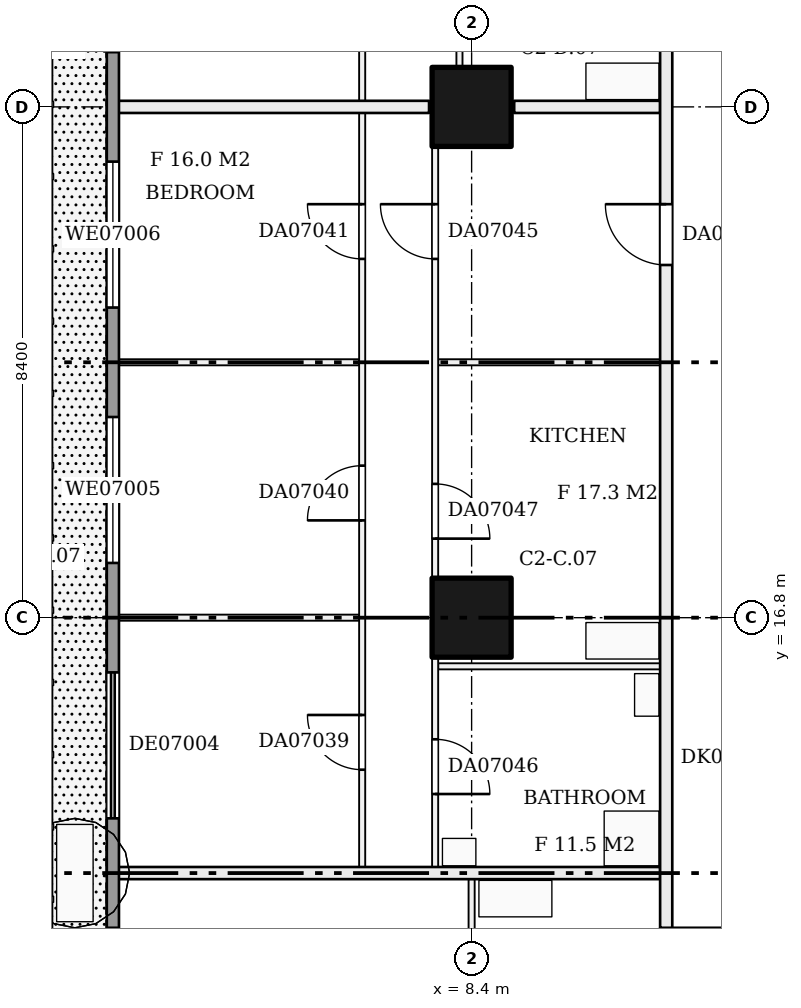
"""IFC4 building model, lengths in metres.
Left out: names, types, materials, properties, quantities, classifications, styles, units other than length and angle.
Written with IfcOpenShell. Run it as: python <this file> out.ifc"""

import sys

from ifc_helpers import new_model, si_unit, direction, frame, frame_2d, origin, origin_2d, place, context, subcontext, project, spatial, rectangle, extrude, element, fill, save


model = new_model("IFC4")
c1 = context("Model", 3, precision=1e-05, world=origin(), true_north=direction((0.0, 1.0)))
c2 = subcontext(c1, "Body", "Model", "MODEL_VIEW")
j1 = project(units=[si_unit("LENGTHUNIT", "METRE"), si_unit("PLANEANGLEUNIT", "RADIAN")], contexts=[c1])
p1 = place(None, origin())
s1 = spatial("IfcSite", under=j1, at=p1, CompositionType="ELEMENT")
p2 = place(p1, origin())
s2 = spatial("IfcBuilding", under=s1, at=p2, CompositionType="ELEMENT")
p3 = place(p2, frame((0.0, 0.0, 35.7)))
s3 = spatial("IfcBuildingStorey", under=s2, at=p3, CompositionType="ELEMENT", Elevation=35.7)
for number, where, z_axis, x_axis in (
    (1, (8.4, 16.8, 0.0), (0.0, 0.0, 1.0), (1.0, 0.0, 0.0)),
    (2, (8.4, 25.2, 0.0), (0.0, 0.0, 1.0), (1.0, 0.0, 0.0)),
):
    element("IfcColumn", number, at=place(p3, frame(where, z_axis=z_axis, x_axis=x_axis)), inside=s3, PredefinedType="COLUMN", context=c2, shape_type="SweptSolid", body=[
        extrude(rectangle(XDim=1.3, YDim=1.3, at=origin_2d()), origin(), (0.0, 0.0, 1.0), 3.22),
    ])
p4 = place(p3, frame((11.5, 11.6, 0.0), z_axis=(0.0, 0.0, 1.0), x_axis=(1.0, 0.0, 0.0)))
e3 = element("IfcWall", 3, at=p4, inside=s3, PredefinedType="PARTITIONING", context=c2, shape_type="SweptSolid", body=[
    extrude(rectangle(XDim=30.5, YDim=0.2, at=frame_2d((15.25, 0.0))), origin(), (0.0, 0.0, 1.0), 3.22),
])
p5 = place(p4, frame((3.84, 0.0, 0.0)))
e4 = element("IfcOpeningElement", 4, at=p5, cuts=e3, PredefinedType="OPENING", context=c2, shape_type="SweptSolid", body=[
    extrude(rectangle(XDim=1.0, YDim=2.1, at=frame_2d((0.5, 1.05))), frame((0.0, 0.11, 0.0), z_axis=(0.0, -1.0, 0.0), x_axis=(1.0, 0.0, 0.0)), (0.0, 0.0, 1.0), 0.22),
])
p6 = place(p4, frame((18.933, 0.0, 0.0)))
e5 = element("IfcOpeningElement", 5, at=p6, cuts=e3, PredefinedType="OPENING", context=c2, shape_type="SweptSolid", body=[
    extrude(rectangle(XDim=1.0, YDim=2.1, at=frame_2d((0.5, 1.05))), frame((0.0, 0.11, 0.0), z_axis=(0.0, -1.0, 0.0), x_axis=(1.0, 0.0, 0.0)), (0.0, 0.0, 1.0), 0.22),
])
p7 = place(p4, frame((28.733, 0.0, 0.0)))
e6 = element("IfcOpeningElement", 6, at=p7, cuts=e3, PredefinedType="OPENING", context=c2, shape_type="SweptSolid", body=[
    extrude(rectangle(XDim=1.0, YDim=2.1, at=frame_2d((0.5, 1.05))), frame((0.0, 0.11, 0.0), z_axis=(0.0, -1.0, 0.0), x_axis=(1.0, 0.0, 0.0)), (0.0, 0.0, 1.0), 0.22),
])
p8 = place(p3, frame((2.5, 12.6, 0.0), z_axis=(0.0, 0.0, 1.0), x_axis=(1.0, 0.0, 0.0)))
e7 = element("IfcWall", 7, at=p8, inside=s3, PredefinedType="PARTITIONING", context=c2, shape_type="SweptSolid", body=[
    extrude(rectangle(XDim=9.0, YDim=0.2, at=frame_2d((4.5, 0.0))), origin(), (0.0, 0.0, 1.0), 3.22),
])
p9 = place(p3, frame((7.85, 16.0, 0.0), z_axis=(0.0, 0.0, 1.0), x_axis=(1.0, 0.0, 0.0)))
e8 = element("IfcWall", 8, at=p9, inside=s3, PredefinedType="PARTITIONING", context=c2, shape_type="SweptSolid", body=[
    extrude(rectangle(XDim=3.65, YDim=0.1, at=frame_2d((1.825, 0.0))), origin(), (0.0, 0.0, 1.0), 3.22),
])
for number, where, z_axis, x_axis in (
    (9, (2.5, 16.8, 0.0), (0.0, 0.0, 1.0), (1.0, 0.0, 0.0)),
    (10, (2.5, 21.0, 0.0), (0.0, 0.0, 1.0), (1.0, 0.0, 0.0)),
):
    element("IfcWall", number, at=place(p3, frame(where, z_axis=z_axis, x_axis=x_axis)), inside=s3, PredefinedType="PARTITIONING", context=c2, shape_type="SweptSolid", body=[
        extrude(rectangle(XDim=4.05, YDim=0.1, at=frame_2d((2.025, 0.0))), origin(), (0.0, 0.0, 1.0), 3.22),
    ])
p10 = place(p3, frame((7.85, 21.0, 0.0), z_axis=(0.0, 0.0, 1.0), x_axis=(1.0, 0.0, 0.0)))
e11 = element("IfcWall", 11, at=p10, inside=s3, PredefinedType="PARTITIONING", context=c2, shape_type="SweptSolid", body=[
    extrude(rectangle(XDim=3.65, YDim=0.1, at=frame_2d((1.825, 0.0))), origin(), (0.0, 0.0, 1.0), 3.22),
])
p11 = place(p3, frame((2.5, 25.2, 0.0), z_axis=(0.0, 0.0, 1.0), x_axis=(1.0, 0.0, 0.0)))
e12 = element("IfcWall", 12, at=p11, inside=s3, PredefinedType="PARTITIONING", context=c2, shape_type="SweptSolid", body=[
    extrude(rectangle(XDim=5.2, YDim=0.2, at=frame_2d((2.6, 0.0))), origin(), (0.0, 0.0, 1.0), 3.22),
])
p12 = place(p3, frame((9.1, 25.2, 0.0), z_axis=(0.0, 0.0, 1.0), x_axis=(1.0, 0.0, 0.0)))
e13 = element("IfcWall", 13, at=p12, inside=s3, PredefinedType="PARTITIONING", context=c2, shape_type="SweptSolid", body=[
    extrude(rectangle(XDim=2.4, YDim=0.2, at=frame_2d((1.2, 0.0))), origin(), (0.0, 0.0, 1.0), 3.22),
])
p13 = place(p3, frame((6.6, 12.7, 0.0), z_axis=(0.0, 0.0, 1.0), x_axis=(0.0, 1.0, 0.0)))
e14 = element("IfcWall", 14, at=p13, inside=s3, PredefinedType="PARTITIONING", context=c2, shape_type="SweptSolid", body=[
    extrude(rectangle(XDim=29.2, YDim=0.1, at=frame_2d((14.6, 0.0))), origin(), (0.0, 0.0, 1.0), 3.22),
])
p14 = place(p13, frame((1.6, 0.0, 0.0)))
e15 = element("IfcOpeningElement", 15, at=p14, cuts=e14, PredefinedType="OPENING", context=c2, shape_type="SweptSolid", body=[
    extrude(rectangle(XDim=0.9, YDim=2.1, at=frame_2d((0.45, 1.05))), frame((0.0, 0.06, 0.0), z_axis=(0.0, -1.0, 0.0), x_axis=(1.0, 0.0, 0.0)), (0.0, 0.0, 1.0), 0.12),
])
p15 = place(p13, frame((5.7, 0.0, 0.0)))
e16 = element("IfcOpeningElement", 16, at=p15, cuts=e14, PredefinedType="OPENING", context=c2, shape_type="SweptSolid", body=[
    extrude(rectangle(XDim=0.9, YDim=2.1, at=frame_2d((0.45, 1.05))), frame((0.0, 0.06, 0.0), z_axis=(0.0, -1.0, 0.0), x_axis=(1.0, 0.0, 0.0)), (0.0, 0.0, 1.0), 0.12),
])
p16 = place(p13, frame((10.0, 0.0, 0.0)))
e17 = element("IfcOpeningElement", 17, at=p16, cuts=e14, PredefinedType="OPENING", context=c2, shape_type="SweptSolid", body=[
    extrude(rectangle(XDim=0.9, YDim=2.1, at=frame_2d((0.45, 1.05))), frame((0.0, 0.06, 0.0), z_axis=(0.0, -1.0, 0.0), x_axis=(1.0, 0.0, 0.0)), (0.0, 0.0, 1.0), 0.12),
])
p17 = place(p13, frame((16.2, 0.0, 0.0)))
e18 = element("IfcOpeningElement", 18, at=p17, cuts=e14, PredefinedType="OPENING", context=c2, shape_type="SweptSolid", body=[
    extrude(rectangle(XDim=0.9, YDim=2.1, at=frame_2d((0.45, 1.05))), frame((0.0, 0.06, 0.0), z_axis=(0.0, -1.0, 0.0), x_axis=(1.0, 0.0, 0.0)), (0.0, 0.0, 1.0), 0.12),
])
p18 = place(p13, frame((22.5, 0.0, 0.0)))
e19 = element("IfcOpeningElement", 19, at=p18, cuts=e14, PredefinedType="OPENING", context=c2, shape_type="SweptSolid", body=[
    extrude(rectangle(XDim=0.9, YDim=2.1, at=frame_2d((0.45, 1.05))), frame((0.0, 0.06, 0.0), z_axis=(0.0, -1.0, 0.0), x_axis=(1.0, 0.0, 0.0)), (0.0, 0.0, 1.0), 0.12),
])
p19 = place(p13, frame((26.7, 0.0, 0.0)))
e20 = element("IfcOpeningElement", 20, at=p19, cuts=e14, PredefinedType="OPENING", context=c2, shape_type="SweptSolid", body=[
    extrude(rectangle(XDim=0.9, YDim=2.1, at=frame_2d((0.45, 1.05))), frame((0.0, 0.06, 0.0), z_axis=(0.0, -1.0, 0.0), x_axis=(1.0, 0.0, 0.0)), (0.0, 0.0, 1.0), 0.12),
])
p20 = place(p3, frame((7.8, 12.7, 0.0), z_axis=(0.0, 0.0, 1.0), x_axis=(0.0, 1.0, 0.0)))
e21 = element("IfcWall", 21, at=p20, inside=s3, PredefinedType="PARTITIONING", context=c2, shape_type="SweptSolid", body=[
    extrude(rectangle(XDim=12.4, YDim=0.1, at=frame_2d((6.2, 0.0))), origin(), (0.0, 0.0, 1.0), 3.22),
])
p21 = place(p20, frame((10.0, 0.0, 0.0)))
e22 = element("IfcOpeningElement", 22, at=p21, cuts=e21, PredefinedType="OPENING", context=c2, shape_type="SweptSolid", body=[
    extrude(rectangle(XDim=0.9, YDim=2.1, at=frame_2d((0.45, 1.05))), frame((0.0, 0.06, 0.0), z_axis=(0.0, -1.0, 0.0), x_axis=(1.0, 0.0, 0.0)), (0.0, 0.0, 1.0), 0.12),
])
p22 = place(p20, frame((1.2, 0.0, 0.0)))
e23 = element("IfcOpeningElement", 23, at=p22, cuts=e21, PredefinedType="OPENING", context=c2, shape_type="SweptSolid", body=[
    extrude(rectangle(XDim=0.9, YDim=2.1, at=frame_2d((0.45, 1.05))), frame((0.0, 0.06, 0.0), z_axis=(0.0, -1.0, 0.0), x_axis=(1.0, 0.0, 0.0)), (0.0, 0.0, 1.0), 0.12),
])
p23 = place(p20, frame((5.4, 0.0, 0.0)))
e24 = element("IfcOpeningElement", 24, at=p23, cuts=e21, PredefinedType="OPENING", context=c2, shape_type="SweptSolid", body=[
    extrude(rectangle(XDim=0.9, YDim=2.1, at=frame_2d((0.45, 1.05))), frame((0.0, 0.06, 0.0), z_axis=(0.0, -1.0, 0.0), x_axis=(1.0, 0.0, 0.0)), (0.0, 0.0, 1.0), 0.12),
])
p24 = place(p3, frame((8.2, 25.3, 0.0), z_axis=(0.0, 0.0, 1.0), x_axis=(0.0, 1.0, 0.0)))
e25 = element("IfcWall", 25, at=p24, inside=s3, PredefinedType="PARTITIONING", context=c2, shape_type="SweptSolid", body=[
    extrude(rectangle(XDim=16.6, YDim=0.1, at=frame_2d((8.3, 0.0))), origin(), (0.0, 0.0, 1.0), 3.22),
])
p25 = place(p24, frame((9.167, 0.0, 0.0)))
e26 = element("IfcOpeningElement", 26, at=p25, cuts=e25, PredefinedType="OPENING", context=c2, shape_type="SweptSolid", body=[
    extrude(rectangle(XDim=0.9, YDim=2.1, at=frame_2d((0.45, 1.05))), frame((0.0, 0.06, 0.0), z_axis=(0.0, -1.0, 0.0), x_axis=(1.0, 0.0, 0.0)), (0.0, 0.0, 1.0), 0.12),
])
p26 = place(p24, frame((2.5, 0.0, 0.0)))
e27 = element("IfcOpeningElement", 27, at=p26, cuts=e25, PredefinedType="OPENING", context=c2, shape_type="SweptSolid", body=[
    extrude(rectangle(XDim=0.9, YDim=2.1, at=frame_2d((0.45, 1.05))), frame((0.0, 0.06, 0.0), z_axis=(0.0, -1.0, 0.0), x_axis=(1.0, 0.0, 0.0)), (0.0, 0.0, 1.0), 0.12),
])
p27 = place(p24, frame((13.533, 0.0, 0.0)))
e28 = element("IfcOpeningElement", 28, at=p27, cuts=e25, PredefinedType="OPENING", context=c2, shape_type="SweptSolid", body=[
    extrude(rectangle(XDim=0.9, YDim=2.1, at=frame_2d((0.45, 1.05))), frame((0.0, 0.06, 0.0), z_axis=(0.0, -1.0, 0.0), x_axis=(1.0, 0.0, 0.0)), (0.0, 0.0, 1.0), 0.12),
])
p28 = place(p3, frame((8.4, 9.1, 0.0), z_axis=(0.0, 0.0, 1.0), x_axis=(0.0, 1.0, 0.0)))
e29 = element("IfcWall", 29, at=p28, inside=s3, PredefinedType="PARTITIONING", context=c2, shape_type="SweptSolid", body=[
    extrude(rectangle(XDim=3.4, YDim=0.1, at=frame_2d((1.7, 0.0))), origin(), (0.0, 0.0, 1.0), 3.22),
])
p29 = place(p3, frame((11.6, 11.7, 0.0), z_axis=(0.0, 0.0, 1.0), x_axis=(0.0, 1.0, 0.0)))
e30 = element("IfcWall", 30, at=p29, inside=s3, PredefinedType="PARTITIONING", context=c2, shape_type="SweptSolid", body=[
    extrude(rectangle(XDim=30.3, YDim=0.2, at=frame_2d((15.15, 0.0))), origin(), (0.0, 0.0, 1.0), 3.22),
])
p30 = place(p29, frame((10.9, 0.0, 0.0)))
e31 = element("IfcOpeningElement", 31, at=p30, cuts=e30, PredefinedType="OPENING", context=c2, shape_type="SweptSolid", body=[
    extrude(rectangle(XDim=1.0, YDim=2.1, at=frame_2d((0.5, 1.05))), frame((0.0, 0.11, 0.0), z_axis=(0.0, -1.0, 0.0), x_axis=(1.0, 0.0, 0.0)), (0.0, 0.0, 1.0), 0.22),
])
p31 = place(p29, frame((21.667, 0.0, 0.0)))
e32 = element("IfcOpeningElement", 32, at=p31, cuts=e30, PredefinedType="OPENING", context=c2, shape_type="SweptSolid", body=[
    extrude(rectangle(XDim=1.0, YDim=2.1, at=frame_2d((0.5, 1.05))), frame((0.0, 0.11, 0.0), z_axis=(0.0, -1.0, 0.0), x_axis=(1.0, 0.0, 0.0)), (0.0, 0.0, 1.0), 0.22),
])
p32 = place(p3, frame((2.5, 53.8, 0.0), z_axis=(0.0, 0.0, 1.0), x_axis=(0.0, -1.0, 0.0)))
e33 = element("IfcWall", 33, at=p32, inside=s3, PredefinedType="SOLIDWALL", context=c2, shape_type="SweptSolid", body=[
    extrude(rectangle(XDim=48.8, YDim=0.2, at=frame_2d((24.4, 0.0))), origin(), (0.0, 0.0, 1.0), 3.22),
])
p33 = place(p32, frame((46.1, 0.0, 0.0)))
e34 = element("IfcOpeningElement", 34, at=p33, cuts=e33, PredefinedType="OPENING", context=c2, shape_type="SweptSolid", body=[
    extrude(rectangle(XDim=2.4, YDim=2.2, at=frame_2d((1.2, 1.1))), frame((0.0, 0.11, 0.0), z_axis=(0.0, -1.0, 0.0), x_axis=(1.0, 0.0, 0.0)), (0.0, 0.0, 1.0), 0.22),
])
p34 = place(p32, frame((42.1, 0.0, 0.0)))
e35 = element("IfcOpeningElement", 35, at=p34, cuts=e33, PredefinedType="OPENING", context=c2, shape_type="SweptSolid", body=[
    extrude(rectangle(XDim=2.4, YDim=2.2, at=frame_2d((1.2, 1.1))), frame((0.0, 0.11, 0.0), z_axis=(0.0, -1.0, 0.0), x_axis=(1.0, 0.0, 0.0)), (0.0, 0.0, 1.0), 0.22),
])
p35 = place(p32, frame((37.9, 0.0, 0.0)))
e36 = element("IfcOpeningElement", 36, at=p35, cuts=e33, PredefinedType="OPENING", context=c2, shape_type="SweptSolid", body=[
    extrude(rectangle(XDim=2.4, YDim=2.2, at=frame_2d((1.2, 1.1))), frame((0.0, 0.11, 0.0), z_axis=(0.0, -1.0, 0.0), x_axis=(1.0, 0.0, 0.0)), (0.0, 0.0, 1.0), 0.22),
])
p36 = place(p32, frame((33.7, 0.0, 0.9)))
e37 = element("IfcOpeningElement", 37, at=p36, cuts=e33, PredefinedType="OPENING", context=c2, shape_type="SweptSolid", body=[
    extrude(rectangle(XDim=2.4, YDim=1.5, at=frame_2d((1.2, 0.75))), frame((0.0, 0.11, 0.0), z_axis=(0.0, -1.0, 0.0), x_axis=(1.0, 0.0, 0.0)), (0.0, 0.0, 1.0), 0.22),
])
p37 = place(p32, frame((29.5, 0.0, 0.9)))
e38 = element("IfcOpeningElement", 38, at=p37, cuts=e33, PredefinedType="OPENING", context=c2, shape_type="SweptSolid", body=[
    extrude(rectangle(XDim=2.4, YDim=1.5, at=frame_2d((1.2, 0.75))), frame((0.0, 0.11, 0.0), z_axis=(0.0, -1.0, 0.0), x_axis=(1.0, 0.0, 0.0)), (0.0, 0.0, 1.0), 0.22),
])
p38 = place(p32, frame((25.3, 0.0, 0.0)))
e39 = element("IfcOpeningElement", 39, at=p38, cuts=e33, PredefinedType="OPENING", context=c2, shape_type="SweptSolid", body=[
    extrude(rectangle(XDim=2.4, YDim=2.2, at=frame_2d((1.2, 1.1))), frame((0.0, 0.11, 0.0), z_axis=(0.0, -1.0, 0.0), x_axis=(1.0, 0.0, 0.0)), (0.0, 0.0, 1.0), 0.22),
])
p39 = place(p32, frame((21.1, 0.0, 0.0)))
e40 = element("IfcOpeningElement", 40, at=p39, cuts=e33, PredefinedType="OPENING", context=c2, shape_type="SweptSolid", body=[
    extrude(rectangle(XDim=2.4, YDim=2.2, at=frame_2d((1.2, 1.1))), frame((0.0, 0.11, 0.0), z_axis=(0.0, -1.0, 0.0), x_axis=(1.0, 0.0, 0.0)), (0.0, 0.0, 1.0), 0.22),
])
p40 = place(p32, frame((16.9, 0.0, 0.9)))
e41 = element("IfcOpeningElement", 41, at=p40, cuts=e33, PredefinedType="OPENING", context=c2, shape_type="SweptSolid", body=[
    extrude(rectangle(XDim=2.4, YDim=1.5, at=frame_2d((1.2, 0.75))), frame((0.0, 0.11, 0.0), z_axis=(0.0, -1.0, 0.0), x_axis=(1.0, 0.0, 0.0)), (0.0, 0.0, 1.0), 0.22),
])
p41 = place(p32, frame((12.7, 0.0, 0.9)))
e42 = element("IfcOpeningElement", 42, at=p41, cuts=e33, PredefinedType="OPENING", context=c2, shape_type="SweptSolid", body=[
    extrude(rectangle(XDim=2.4, YDim=1.5, at=frame_2d((1.2, 0.75))), frame((0.0, 0.11, 0.0), z_axis=(0.0, -1.0, 0.0), x_axis=(1.0, 0.0, 0.0)), (0.0, 0.0, 1.0), 0.22),
])
p42 = place(p32, frame((8.5, 0.0, 0.9)))
e43 = element("IfcOpeningElement", 43, at=p42, cuts=e33, PredefinedType="OPENING", context=c2, shape_type="SweptSolid", body=[
    extrude(rectangle(XDim=2.4, YDim=1.5, at=frame_2d((1.2, 0.75))), frame((0.0, 0.11, 0.0), z_axis=(0.0, -1.0, 0.0), x_axis=(1.0, 0.0, 0.0)), (0.0, 0.0, 1.0), 0.22),
])
p43 = place(p32, frame((4.3, 0.0, 0.9)))
e44 = element("IfcOpeningElement", 44, at=p43, cuts=e33, PredefinedType="OPENING", context=c2, shape_type="SweptSolid", body=[
    extrude(rectangle(XDim=2.4, YDim=1.5, at=frame_2d((1.2, 0.75))), frame((0.0, 0.11, 0.0), z_axis=(0.0, -1.0, 0.0), x_axis=(1.0, 0.0, 0.0)), (0.0, 0.0, 1.0), 0.22),
])
p44 = place(p32, frame((0.3, 0.0, 0.9)))
e45 = element("IfcOpeningElement", 45, at=p44, cuts=e33, PredefinedType="OPENING", context=c2, shape_type="SweptSolid", body=[
    extrude(rectangle(XDim=2.4, YDim=1.5, at=frame_2d((1.2, 0.75))), frame((0.0, 0.11, 0.0), z_axis=(0.0, -1.0, 0.0), x_axis=(1.0, 0.0, 0.0)), (0.0, 0.0, 1.0), 0.22),
])
p45 = place(p14, origin())
e46 = element("IfcDoor", 46, at=p45, inside=s3, OperationType="SINGLE_SWING_RIGHT", PredefinedType="DOOR", context=c2, shape_type="SweptSolid", body=[
    extrude(rectangle(XDim=0.9, YDim=2.1, at=frame_2d((0.45, 1.05))), frame((0.0, 0.025, 0.0), z_axis=(0.0, -1.0, 0.0), x_axis=(1.0, 0.0, 0.0)), (0.0, 0.0, 1.0), 0.05),
])
fill(e15, e46)
p46 = place(p15, origin())
e47 = element("IfcDoor", 47, at=p46, inside=s3, OperationType="SINGLE_SWING_LEFT", PredefinedType="DOOR", context=c2, shape_type="SweptSolid", body=[
    extrude(rectangle(XDim=0.9, YDim=2.1, at=frame_2d((0.45, 1.05))), frame((0.0, 0.025, 0.0), z_axis=(0.0, -1.0, 0.0), x_axis=(1.0, 0.0, 0.0)), (0.0, 0.0, 1.0), 0.05),
])
fill(e16, e47)
p47 = place(p16, origin())
e48 = element("IfcDoor", 48, at=p47, inside=s3, OperationType="SINGLE_SWING_RIGHT", PredefinedType="DOOR", context=c2, shape_type="SweptSolid", body=[
    extrude(rectangle(XDim=0.9, YDim=2.1, at=frame_2d((0.45, 1.05))), frame((0.0, 0.025, 0.0), z_axis=(0.0, -1.0, 0.0), x_axis=(1.0, 0.0, 0.0)), (0.0, 0.0, 1.0), 0.05),
])
fill(e17, e48)
p48 = place(p21, origin())
e49 = element("IfcDoor", 49, at=p48, inside=s3, OperationType="SINGLE_SWING_RIGHT", PredefinedType="DOOR", context=c2, shape_type="SweptSolid", body=[
    extrude(rectangle(XDim=0.9, YDim=2.1, at=frame_2d((0.45, 1.05))), frame((0.0, 0.025, 0.0), z_axis=(0.0, -1.0, 0.0), x_axis=(1.0, 0.0, 0.0)), (0.0, 0.0, 1.0), 0.05),
])
fill(e22, e49)
p49 = place(p22, frame((0.9, 0.0, 0.0), z_axis=(0.0, 0.0, 1.0), x_axis=(-1.0, 0.0, 0.0)))
e50 = element("IfcDoor", 50, at=p49, inside=s3, OperationType="SINGLE_SWING_RIGHT", PredefinedType="DOOR", context=c2, shape_type="SweptSolid", body=[
    extrude(rectangle(XDim=0.9, YDim=2.1, at=frame_2d((0.45, 1.05))), frame((0.0, 0.025, 0.0), z_axis=(0.0, -1.0, 0.0), x_axis=(1.0, 0.0, 0.0)), (0.0, 0.0, 1.0), 0.05),
])
fill(e23, e50)
p50 = place(p23, frame((0.9, 0.0, 0.0), z_axis=(0.0, 0.0, 1.0), x_axis=(-1.0, 0.0, 0.0)))
e51 = element("IfcDoor", 51, at=p50, inside=s3, OperationType="SINGLE_SWING_RIGHT", PredefinedType="DOOR", context=c2, shape_type="SweptSolid", body=[
    extrude(rectangle(XDim=0.9, YDim=2.1, at=frame_2d((0.45, 1.05))), frame((0.0, 0.025, 0.0), z_axis=(0.0, -1.0, 0.0), x_axis=(1.0, 0.0, 0.0)), (0.0, 0.0, 1.0), 0.05),
])
fill(e24, e51)
p51 = place(p30, origin())
e52 = element("IfcDoor", 52, at=p51, inside=s3, OperationType="SINGLE_SWING_RIGHT", PredefinedType="DOOR", context=c2, shape_type="SweptSolid", body=[
    extrude(rectangle(XDim=1.0, YDim=2.1, at=frame_2d((0.5, 1.05))), frame((0.0, 0.025, 0.0), z_axis=(0.0, -1.0, 0.0), x_axis=(1.0, 0.0, 0.0)), (0.0, 0.0, 1.0), 0.05),
])
fill(e31, e52)
p52 = place(p35, origin())
e53 = element("IfcDoor", 53, at=p52, inside=s3, OperationType="DOUBLE_DOOR_SLIDING", PredefinedType="DOOR", context=c2, shape_type="SweptSolid", body=[
    extrude(rectangle(XDim=2.4, YDim=2.2, at=frame_2d((1.2, 1.1))), frame((0.0, 0.025, 0.0), z_axis=(0.0, -1.0, 0.0), x_axis=(1.0, 0.0, 0.0)), (0.0, 0.0, 1.0), 0.05),
])
fill(e36, e53)
p53 = place(p36, origin())
e54 = element("IfcWindow", 54, at=p53, inside=s3, PartitioningType="SINGLE_PANEL", PredefinedType="WINDOW", context=c2, shape_type="SweptSolid", body=[
    extrude(rectangle(XDim=2.4, YDim=1.5, at=frame_2d((1.2, 0.75))), frame((0.0, 0.03, 0.0), z_axis=(0.0, -1.0, 0.0), x_axis=(1.0, 0.0, 0.0)), (0.0, 0.0, 1.0), 0.06),
])
fill(e37, e54)
p54 = place(p37, origin())
e55 = element("IfcWindow", 55, at=p54, inside=s3, PartitioningType="SINGLE_PANEL", PredefinedType="WINDOW", context=c2, shape_type="SweptSolid", body=[
    extrude(rectangle(XDim=2.4, YDim=1.5, at=frame_2d((1.2, 0.75))), frame((0.0, 0.03, 0.0), z_axis=(0.0, -1.0, 0.0), x_axis=(1.0, 0.0, 0.0)), (0.0, 0.0, 1.0), 0.06),
])
fill(e38, e55)
save(model, sys.argv[1])
